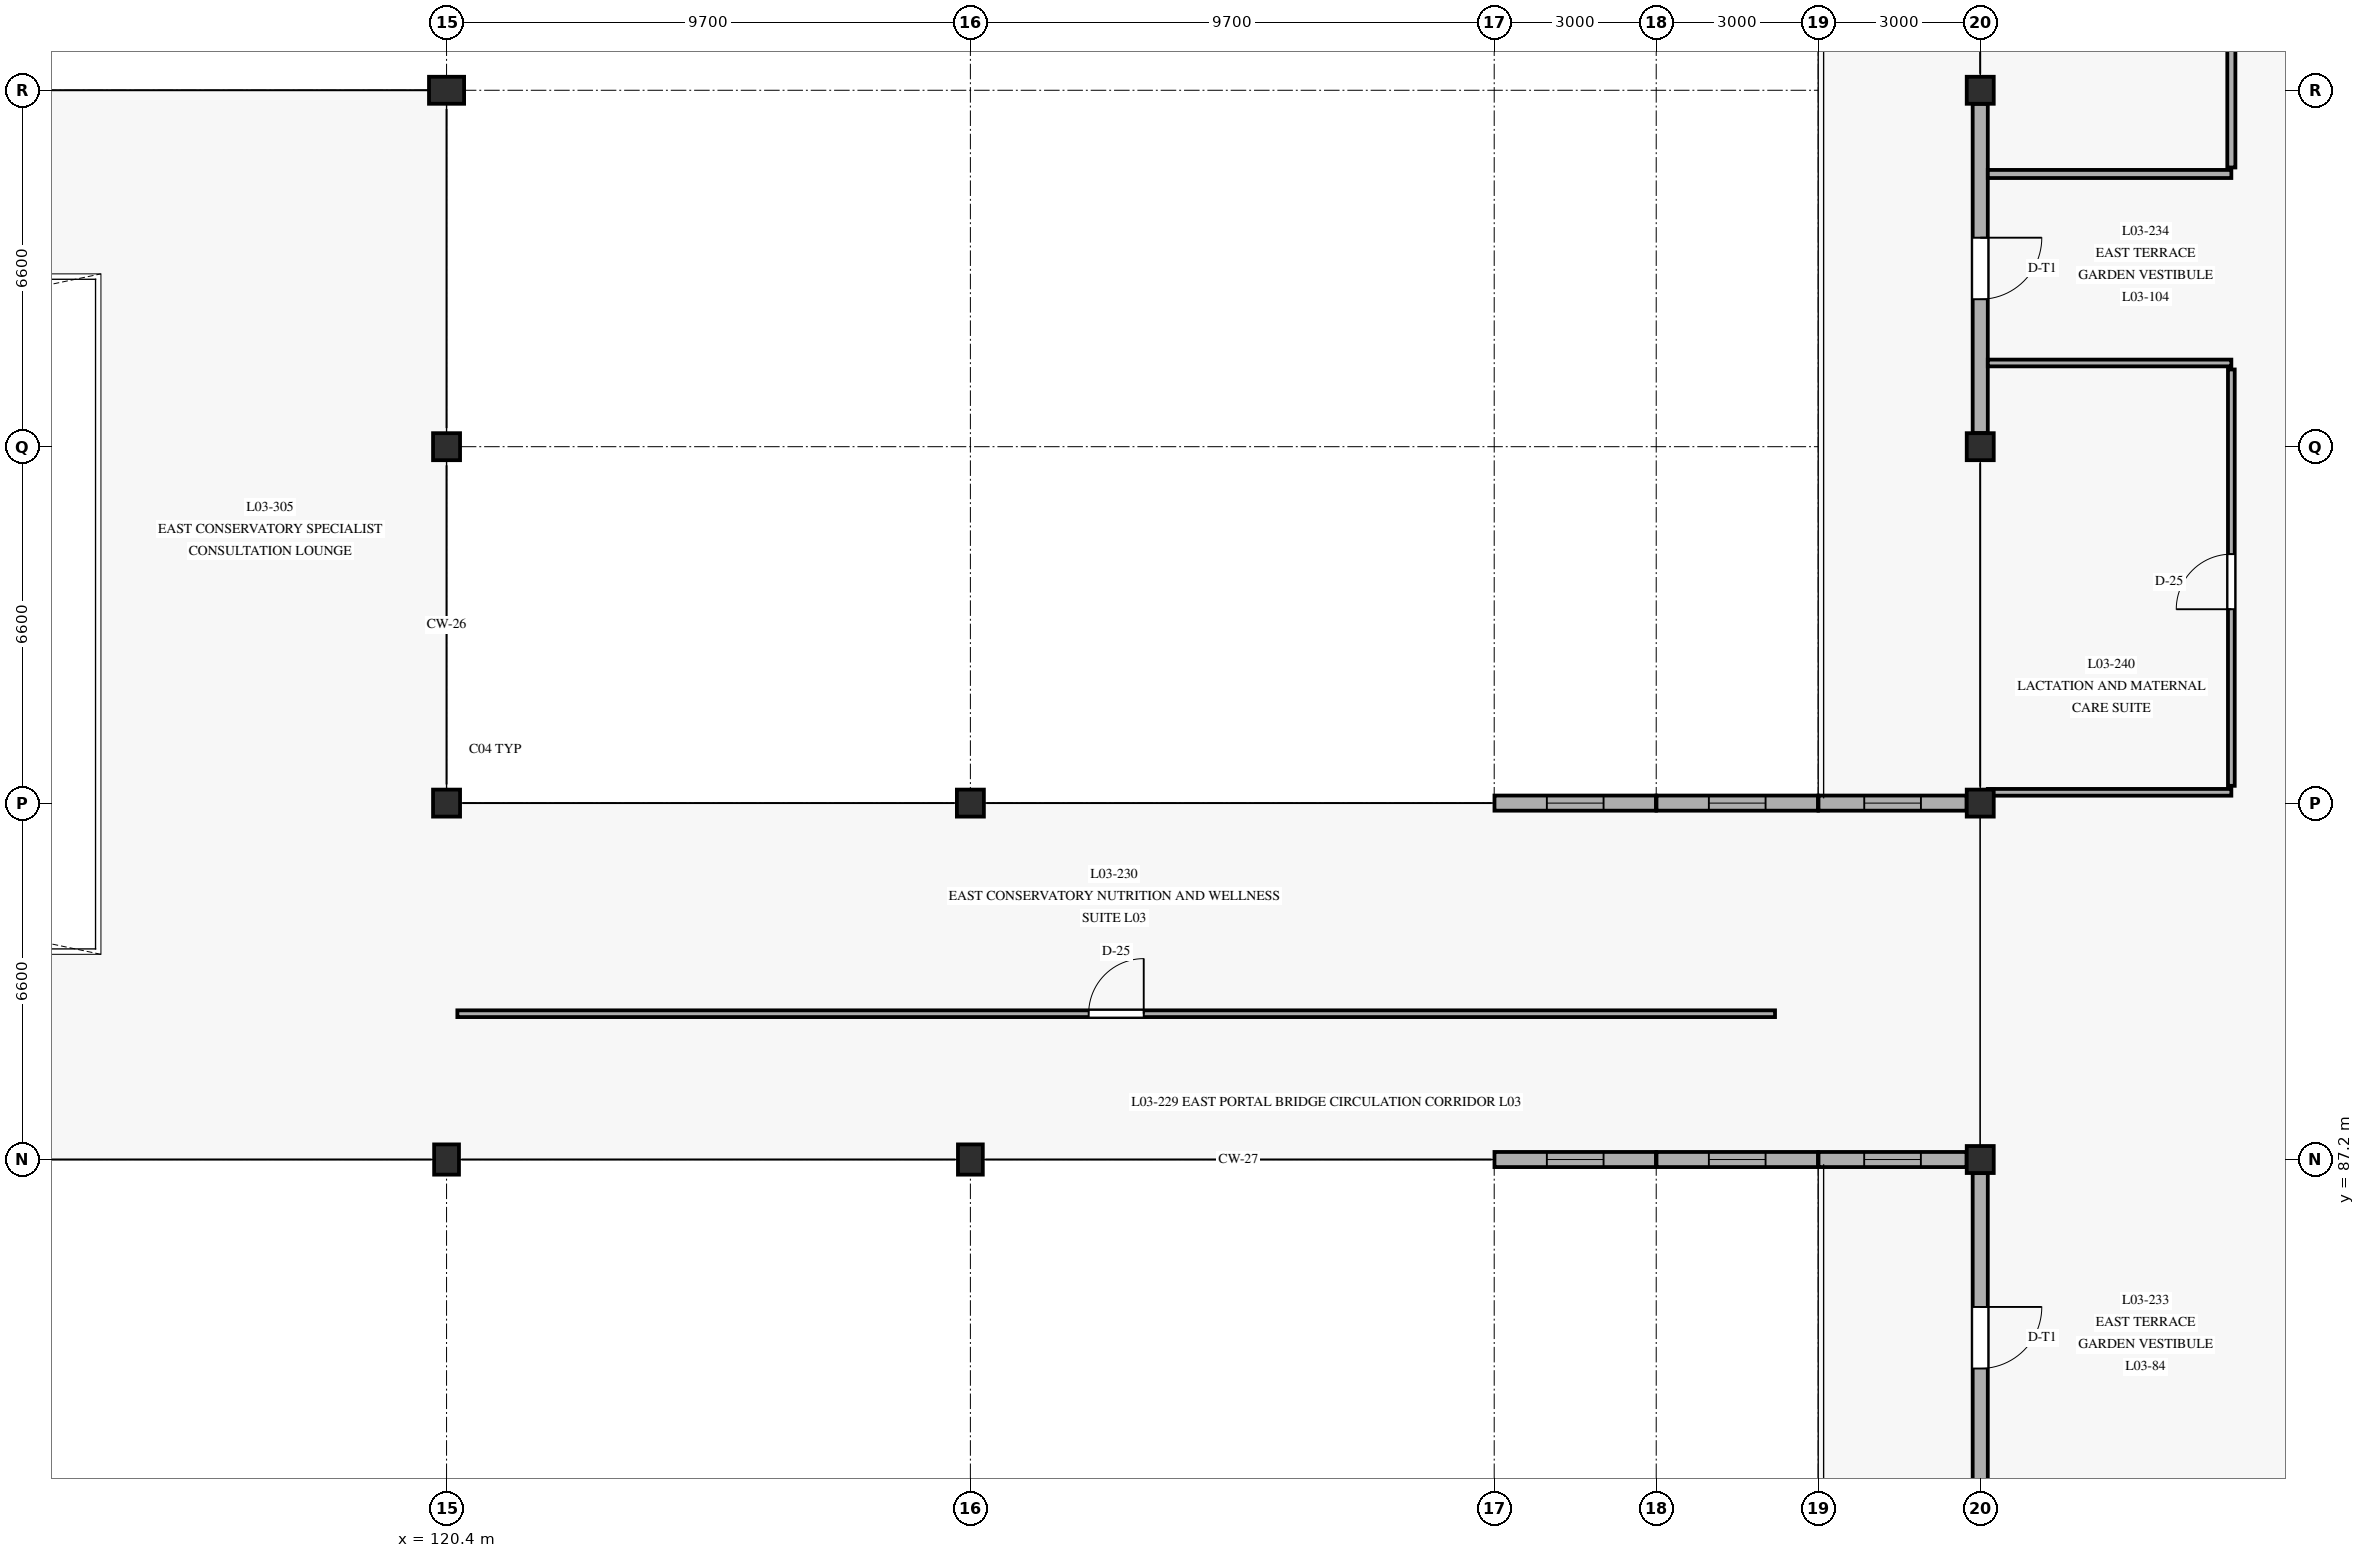
"""IFC4 building model, lengths in metres.
Left out: names, types, materials, properties, quantities, classifications, styles, units other than length and angle.
Written with IfcOpenShell. Run it as: python <this file> out.ifc"""

import sys

from ifc_helpers import new_model, si_unit, direction, frame, frame_2d, origin, origin_with_axes, origin_2d, place, context, subcontext, project, spatial, rectangle, extrude, element, fill, save


model = new_model("IFC4")
c1 = context("Model", 3, precision=1e-05, world=origin(), true_north=direction((0.0, 1.0)))
c2 = subcontext(c1, "Body", "Model", "MODEL_VIEW")
j1 = project(units=[si_unit("LENGTHUNIT", "METRE"), si_unit("PLANEANGLEUNIT", "RADIAN")], contexts=[c1])
p1 = place(None, origin())
s1 = spatial("IfcSite", under=j1, at=p1, CompositionType="ELEMENT")
p2 = place(p1, origin())
s2 = spatial("IfcBuilding", under=s1, at=p2, CompositionType="ELEMENT")
p3 = place(p2, frame((0.0, 0.0, 9.3)))
s3 = spatial("IfcBuildingStorey", under=s2, at=p3, CompositionType="ELEMENT", Elevation=9.3)
p4 = place(p3, frame((120.4, 87.2, 0.0), z_axis=(0.0, 0.0, 1.0), x_axis=(1.0, 0.0, 0.0)))
e1 = element("IfcColumn", 1, at=p4, inside=s3, PredefinedType="COLUMN", context=c2, shape_type="SweptSolid", body=[
    extrude(rectangle(XDim=0.46, YDim=0.56, at=origin_2d()), origin(), (0.0, 0.0, 1.0), 4.2),
])
for number, where, z_axis, x_axis in (
    (2, (120.4, 93.8, 0.0), (0.0, 0.0, 1.0), (1.0, 0.0, 0.0)),
    (3, (120.4, 100.4, 0.0), (0.0, 0.0, 1.0), (1.0, 0.0, 0.0)),
):
    element("IfcColumn", number, at=place(p3, frame(where, z_axis=z_axis, x_axis=x_axis)), inside=s3, PredefinedType="COLUMN", context=c2, shape_type="SweptSolid", body=[
        extrude(rectangle(XDim=0.5, YDim=0.5, at=origin_2d()), origin(), (0.0, 0.0, 1.0), 4.2),
    ])
p5 = place(p3, frame((120.4, 107.0, 0.0), z_axis=(0.0, 0.0, 1.0), x_axis=(1.0, 0.0, 0.0)))
e4 = element("IfcColumn", 4, at=p5, inside=s3, PredefinedType="COLUMN", context=c2, shape_type="SweptSolid", body=[
    extrude(rectangle(XDim=0.65, YDim=0.5, at=origin_2d()), origin(), (0.0, 0.0, 1.0), 4.2),
])
p6 = place(p3, frame((130.1, 87.2, 0.0), z_axis=(0.0, 0.0, 1.0), x_axis=(1.0, 0.0, 0.0)))
e5 = element("IfcColumn", 5, at=p6, inside=s3, PredefinedType="COLUMN", context=c2, shape_type="SweptSolid", body=[
    extrude(rectangle(XDim=0.46, YDim=0.56, at=origin_2d()), origin(), (0.0, 0.0, 1.0), 4.2),
])
for number, where, z_axis, x_axis in (
    (6, (130.1, 93.8, 0.0), (0.0, 0.0, 1.0), (1.0, 0.0, 0.0)),
    (7, (148.8, 87.2, 0.0), (0.0, 0.0, 1.0), (1.0, 0.0, 0.0)),
    (8, (148.8, 93.8, 0.0), (0.0, 0.0, 1.0), (1.0, 0.0, 0.0)),
    (9, (148.8, 100.4, 0.0), (0.0, 0.0, 1.0), (1.0, 0.0, 0.0)),
    (10, (148.8, 107.0, 0.0), (0.0, 0.0, 1.0), (1.0, 0.0, 0.0)),
):
    element("IfcColumn", number, at=place(p3, frame(where, z_axis=z_axis, x_axis=x_axis)), inside=s3, PredefinedType="COLUMN", context=c2, shape_type="SweptSolid", body=[
        extrude(rectangle(XDim=0.5, YDim=0.5, at=origin_2d()), origin(), (0.0, 0.0, 1.0), 4.2),
    ])
p7 = place(p3, frame((148.8, 86.948, 0.0), z_axis=(0.0, 0.0, 1.0), x_axis=(0.0, -1.0, 0.0)))
e11 = element("IfcWall", 11, at=p7, inside=s3, PredefinedType="SOLIDWALL", context=c2, shape_type="SweptSolid", body=[
    extrude(rectangle(XDim=6.096, YDim=0.28, at=frame_2d((3.048, 0.0))), origin(), (0.0, 0.0, 1.0), 3.57),
])
p8 = place(p7, frame((2.478, 0.0, 0.0)))
e12 = element("IfcOpeningElement", 12, at=p8, cuts=e11, PredefinedType="OPENING", context=c2, shape_type="SweptSolid", body=[
    extrude(rectangle(XDim=1.14, YDim=2.3, at=frame_2d((0.57, 1.15))), frame((0.0, 0.15, 0.0), z_axis=(0.0, -1.0, 0.0), x_axis=(1.0, 0.0, 0.0)), (0.0, 0.0, 1.0), 0.3),
])
p9 = place(p3, frame((148.8, 106.748, 0.0), z_axis=(0.0, 0.0, 1.0), x_axis=(0.0, -1.0, 0.0)))
e13 = element("IfcWall", 13, at=p9, inside=s3, PredefinedType="SOLIDWALL", context=c2, shape_type="SweptSolid", body=[
    extrude(rectangle(XDim=6.096, YDim=0.28, at=frame_2d((3.048, 0.0))), origin(), (0.0, 0.0, 1.0), 3.57),
])
p10 = place(p9, frame((2.478, 0.0, 0.0)))
e14 = element("IfcOpeningElement", 14, at=p10, cuts=e13, PredefinedType="OPENING", context=c2, shape_type="SweptSolid", body=[
    extrude(rectangle(XDim=1.14, YDim=2.3, at=frame_2d((0.57, 1.15))), frame((0.0, 0.15, 0.0), z_axis=(0.0, -1.0, 0.0), x_axis=(1.0, 0.0, 0.0)), (0.0, 0.0, 1.0), 0.3),
])
p11 = place(p3, frame((139.805, 87.2, 0.0), z_axis=(0.0, 0.0, 1.0), x_axis=(1.0, 0.0, 0.0)))
e15 = element("IfcWall", 15, at=p11, inside=s3, PredefinedType="SOLIDWALL", context=c2, shape_type="SweptSolid", body=[
    extrude(rectangle(XDim=2.99, YDim=0.28, at=frame_2d((1.495, 0.0))), origin(), (0.0, 0.0, 1.0), 3.95),
])
p12 = place(p11, frame((0.97, 0.0, 0.85)))
e16 = element("IfcOpeningElement", 16, at=p12, cuts=e15, PredefinedType="OPENING", context=c2, shape_type="SweptSolid", body=[
    extrude(rectangle(XDim=1.05, YDim=2.2, at=frame_2d((0.525, 1.1))), frame((0.0, 0.15, 0.0), z_axis=(0.0, -1.0, 0.0), x_axis=(1.0, 0.0, 0.0)), (0.0, 0.0, 1.0), 0.3),
])
p13 = place(p3, frame((142.795, 93.8, 0.0), z_axis=(0.0, 0.0, 1.0), x_axis=(-1.0, 0.0, 0.0)))
e17 = element("IfcWall", 17, at=p13, inside=s3, PredefinedType="SOLIDWALL", context=c2, shape_type="SweptSolid", body=[
    extrude(rectangle(XDim=2.99, YDim=0.28, at=frame_2d((1.495, 0.0))), origin(), (0.0, 0.0, 1.0), 3.95),
])
p14 = place(p13, frame((0.97, 0.0, 0.85)))
e18 = element("IfcOpeningElement", 18, at=p14, cuts=e17, PredefinedType="OPENING", context=c2, shape_type="SweptSolid", body=[
    extrude(rectangle(XDim=1.05, YDim=2.2, at=frame_2d((0.525, 1.1))), frame((0.0, 0.15, 0.0), z_axis=(0.0, -1.0, 0.0), x_axis=(1.0, 0.0, 0.0)), (0.0, 0.0, 1.0), 0.3),
])
p15 = place(p3, frame((142.805, 87.2, 0.0), z_axis=(0.0, 0.0, 1.0), x_axis=(1.0, 0.0, 0.0)))
e19 = element("IfcWall", 19, at=p15, inside=s3, PredefinedType="SOLIDWALL", context=c2, shape_type="SweptSolid", body=[
    extrude(rectangle(XDim=2.99, YDim=0.28, at=frame_2d((1.495, 0.0))), origin(), (0.0, 0.0, 1.0), 3.95),
])
p16 = place(p15, frame((0.97, 0.0, 0.85)))
e20 = element("IfcOpeningElement", 20, at=p16, cuts=e19, PredefinedType="OPENING", context=c2, shape_type="SweptSolid", body=[
    extrude(rectangle(XDim=1.05, YDim=2.2, at=frame_2d((0.525, 1.1))), frame((0.0, 0.15, 0.0), z_axis=(0.0, -1.0, 0.0), x_axis=(1.0, 0.0, 0.0)), (0.0, 0.0, 1.0), 0.3),
])
p17 = place(p3, frame((145.795, 93.8, 0.0), z_axis=(0.0, 0.0, 1.0), x_axis=(-1.0, 0.0, 0.0)))
e21 = element("IfcWall", 21, at=p17, inside=s3, PredefinedType="SOLIDWALL", context=c2, shape_type="SweptSolid", body=[
    extrude(rectangle(XDim=2.99, YDim=0.28, at=frame_2d((1.495, 0.0))), origin(), (0.0, 0.0, 1.0), 3.95),
])
p18 = place(p17, frame((0.97, 0.0, 0.85)))
e22 = element("IfcOpeningElement", 22, at=p18, cuts=e21, PredefinedType="OPENING", context=c2, shape_type="SweptSolid", body=[
    extrude(rectangle(XDim=1.05, YDim=2.2, at=frame_2d((0.525, 1.1))), frame((0.0, 0.15, 0.0), z_axis=(0.0, -1.0, 0.0), x_axis=(1.0, 0.0, 0.0)), (0.0, 0.0, 1.0), 0.3),
])
p19 = place(p3, frame((145.805, 87.2, 0.0), z_axis=(0.0, 0.0, 1.0), x_axis=(1.0, 0.0, 0.0)))
e23 = element("IfcWall", 23, at=p19, inside=s3, PredefinedType="SOLIDWALL", context=c2, shape_type="SweptSolid", body=[
    extrude(rectangle(XDim=2.743, YDim=0.28, at=frame_2d((1.372, 0.0))), origin(), (0.0, 0.0, 1.0), 3.95),
])
p20 = place(p19, frame((0.846, 0.0, 0.85)))
e24 = element("IfcOpeningElement", 24, at=p20, cuts=e23, PredefinedType="OPENING", context=c2, shape_type="SweptSolid", body=[
    extrude(rectangle(XDim=1.05, YDim=2.2, at=frame_2d((0.525, 1.1))), frame((0.0, 0.15, 0.0), z_axis=(0.0, -1.0, 0.0), x_axis=(1.0, 0.0, 0.0)), (0.0, 0.0, 1.0), 0.3),
])
p21 = place(p3, frame((148.548, 93.8, 0.0), z_axis=(0.0, 0.0, 1.0), x_axis=(-1.0, 0.0, 0.0)))
e25 = element("IfcWall", 25, at=p21, inside=s3, PredefinedType="SOLIDWALL", context=c2, shape_type="SweptSolid", body=[
    extrude(rectangle(XDim=2.743, YDim=0.28, at=frame_2d((1.372, 0.0))), origin(), (0.0, 0.0, 1.0), 3.95),
])
p22 = place(p21, frame((0.846, 0.0, 0.85)))
e26 = element("IfcOpeningElement", 26, at=p22, cuts=e25, PredefinedType="OPENING", context=c2, shape_type="SweptSolid", body=[
    extrude(rectangle(XDim=1.05, YDim=2.2, at=frame_2d((0.525, 1.1))), frame((0.0, 0.15, 0.0), z_axis=(0.0, -1.0, 0.0), x_axis=(1.0, 0.0, 0.0)), (0.0, 0.0, 1.0), 0.3),
])
p23 = place(p3, frame((120.6, 89.9, 0.0), z_axis=(0.0, 0.0, 1.0), x_axis=(1.0, 0.0, 0.0)))
e27 = element("IfcWall", 27, at=p23, inside=s3, PredefinedType="PARTITIONING", context=c2, shape_type="SweptSolid", body=[
    extrude(rectangle(XDim=24.4, YDim=0.125, at=frame_2d((12.2, 0.0))), origin(), (0.0, 0.0, 1.0), 3.565),
])
p24 = place(p23, frame((11.69, 0.0, 0.0)))
e28 = element("IfcOpeningElement", 28, at=p24, cuts=e27, PredefinedType="OPENING", context=c2, shape_type="SweptSolid", body=[
    extrude(rectangle(XDim=1.02, YDim=2.18, at=frame_2d((0.51, 1.09))), frame((0.0, 0.073, 0.0), z_axis=(0.0, -1.0, 0.0), x_axis=(1.0, 0.0, 0.0)), (0.0, 0.0, 1.0), 0.145),
])
p25 = place(p3, frame((153.45, 94.12, 0.0), z_axis=(0.0, 0.0, 1.0), x_axis=(0.0, 1.0, 0.0)))
e29 = element("IfcWall", 29, at=p25, inside=s3, PredefinedType="PARTITIONING", context=c2, shape_type="SweptSolid", body=[
    extrude(rectangle(XDim=7.71, YDim=0.125, at=frame_2d((3.855, 0.0))), origin(), (0.0, 0.0, 1.0), 3.495),
])
p26 = place(p25, frame((3.27, 0.0, 0.0)))
e30 = element("IfcOpeningElement", 30, at=p26, cuts=e29, PredefinedType="OPENING", context=c2, shape_type="SweptSolid", body=[
    extrude(rectangle(XDim=1.02, YDim=2.18, at=frame_2d((0.51, 1.09))), frame((0.0, 0.073, 0.0), z_axis=(0.0, -1.0, 0.0), x_axis=(1.0, 0.0, 0.0)), (0.0, 0.0, 1.0), 0.145),
])
p27 = place(p3, frame((148.94, 94.0, 0.0), z_axis=(0.0, 0.0, 1.0), x_axis=(1.0, 0.0, 0.0)))
e31 = element("IfcWall", 31, at=p27, inside=s3, PredefinedType="PARTITIONING", context=c2, shape_type="SweptSolid", body=[
    extrude(rectangle(XDim=4.51, YDim=0.125, at=frame_2d((2.255, 0.0))), origin(), (0.0, 0.0, 1.0), 3.495),
])
p28 = place(p3, frame((148.94, 101.95, 0.0), z_axis=(0.0, 0.0, 1.0), x_axis=(1.0, 0.0, 0.0)))
e32 = element("IfcWall", 32, at=p28, inside=s3, PredefinedType="PARTITIONING", context=c2, shape_type="SweptSolid", body=[
    extrude(rectangle(XDim=4.51, YDim=0.125, at=frame_2d((2.255, 0.0))), origin(), (0.0, 0.0, 1.0), 3.565),
])
p29 = place(p3, frame((153.45, 105.57, 0.0), z_axis=(0.0, 0.0, 1.0), x_axis=(0.0, 1.0, 0.0)))
e33 = element("IfcWall", 33, at=p29, inside=s3, PredefinedType="PARTITIONING", context=c2, shape_type="SweptSolid", body=[
    extrude(rectangle(XDim=7.71, YDim=0.15, at=frame_2d((3.855, 0.0))), origin(), (0.0, 0.0, 1.0), 3.495),
])
p30 = place(p29, frame((2.979, 0.0, 0.0)))
e34 = element("IfcOpeningElement", 34, at=p30, cuts=e33, PredefinedType="OPENING", context=c2, shape_type="SweptSolid", body=[
    extrude(rectangle(XDim=1.6, YDim=2.25, at=frame_2d((0.8, 1.125))), frame((0.0, 0.085, 0.0), z_axis=(0.0, -1.0, 0.0), x_axis=(1.0, 0.0, 0.0)), (0.0, 0.0, 1.0), 0.17),
])
p31 = place(p3, frame((148.94, 105.45, 0.0), z_axis=(0.0, 0.0, 1.0), x_axis=(1.0, 0.0, 0.0)))
e35 = element("IfcWall", 35, at=p31, inside=s3, PredefinedType="PARTITIONING", context=c2, shape_type="SweptSolid", body=[
    extrude(rectangle(XDim=4.51, YDim=0.15, at=frame_2d((2.255, 0.0))), origin(), (0.0, 0.0, 1.0), 3.565),
])
p32 = place(p8, frame((1.14, 0.0, 0.0), z_axis=(0.0, 0.0, 1.0), x_axis=(-1.0, 0.0, 0.0)))
e36 = element("IfcDoor", 36, at=p32, inside=s3, OperationType="SINGLE_SWING_RIGHT", PredefinedType="DOOR", context=c2, shape_type="SweptSolid", body=[
    extrude(rectangle(XDim=1.14, YDim=2.3, at=frame_2d((0.57, 1.15))), frame((0.0, 0.025, 0.0), z_axis=(0.0, -1.0, 0.0), x_axis=(1.0, 0.0, 0.0)), (0.0, 0.0, 1.0), 0.05),
])
fill(e12, e36)
p33 = place(p10, frame((1.14, 0.0, 0.0), z_axis=(0.0, 0.0, 1.0), x_axis=(-1.0, 0.0, 0.0)))
e37 = element("IfcDoor", 37, at=p33, inside=s3, OperationType="SINGLE_SWING_RIGHT", PredefinedType="DOOR", context=c2, shape_type="SweptSolid", body=[
    extrude(rectangle(XDim=1.14, YDim=2.3, at=frame_2d((0.57, 1.15))), frame((0.0, 0.025, 0.0), z_axis=(0.0, -1.0, 0.0), x_axis=(1.0, 0.0, 0.0)), (0.0, 0.0, 1.0), 0.05),
])
fill(e14, e37)
p34 = place(p12, origin_with_axes())
e38 = element("IfcWindow", 38, at=p34, inside=s3, PartitioningType="SINGLE_PANEL", PredefinedType="WINDOW", context=c2, shape_type="SweptSolid", body=[
    extrude(rectangle(XDim=1.05, YDim=2.2, at=frame_2d((0.525, 1.1))), frame((0.0, 0.03, 0.0), z_axis=(0.0, -1.0, 0.0), x_axis=(1.0, 0.0, 0.0)), (0.0, 0.0, 1.0), 0.06),
])
fill(e16, e38)
p35 = place(p14, origin_with_axes())
e39 = element("IfcWindow", 39, at=p35, inside=s3, PartitioningType="SINGLE_PANEL", PredefinedType="WINDOW", context=c2, shape_type="SweptSolid", body=[
    extrude(rectangle(XDim=1.05, YDim=2.2, at=frame_2d((0.525, 1.1))), frame((0.0, 0.03, 0.0), z_axis=(0.0, -1.0, 0.0), x_axis=(1.0, 0.0, 0.0)), (0.0, 0.0, 1.0), 0.06),
])
fill(e18, e39)
p36 = place(p16, origin_with_axes())
e40 = element("IfcWindow", 40, at=p36, inside=s3, PartitioningType="SINGLE_PANEL", PredefinedType="WINDOW", context=c2, shape_type="SweptSolid", body=[
    extrude(rectangle(XDim=1.05, YDim=2.2, at=frame_2d((0.525, 1.1))), frame((0.0, 0.03, 0.0), z_axis=(0.0, -1.0, 0.0), x_axis=(1.0, 0.0, 0.0)), (0.0, 0.0, 1.0), 0.06),
])
fill(e20, e40)
p37 = place(p18, origin_with_axes())
e41 = element("IfcWindow", 41, at=p37, inside=s3, PartitioningType="SINGLE_PANEL", PredefinedType="WINDOW", context=c2, shape_type="SweptSolid", body=[
    extrude(rectangle(XDim=1.05, YDim=2.2, at=frame_2d((0.525, 1.1))), frame((0.0, 0.03, 0.0), z_axis=(0.0, -1.0, 0.0), x_axis=(1.0, 0.0, 0.0)), (0.0, 0.0, 1.0), 0.06),
])
fill(e22, e41)
p38 = place(p20, origin_with_axes())
e42 = element("IfcWindow", 42, at=p38, inside=s3, PartitioningType="SINGLE_PANEL", PredefinedType="WINDOW", context=c2, shape_type="SweptSolid", body=[
    extrude(rectangle(XDim=1.05, YDim=2.2, at=frame_2d((0.525, 1.1))), frame((0.0, 0.03, 0.0), z_axis=(0.0, -1.0, 0.0), x_axis=(1.0, 0.0, 0.0)), (0.0, 0.0, 1.0), 0.06),
])
fill(e24, e42)
p39 = place(p22, origin_with_axes())
e43 = element("IfcWindow", 43, at=p39, inside=s3, PartitioningType="SINGLE_PANEL", PredefinedType="WINDOW", context=c2, shape_type="SweptSolid", body=[
    extrude(rectangle(XDim=1.05, YDim=2.2, at=frame_2d((0.525, 1.1))), frame((0.0, 0.03, 0.0), z_axis=(0.0, -1.0, 0.0), x_axis=(1.0, 0.0, 0.0)), (0.0, 0.0, 1.0), 0.06),
])
fill(e26, e43)
p40 = place(p24, origin_with_axes())
e44 = element("IfcDoor", 44, at=p40, inside=s3, OperationType="SINGLE_SWING_RIGHT", PredefinedType="DOOR", context=c2, shape_type="SweptSolid", body=[
    extrude(rectangle(XDim=1.02, YDim=2.18, at=frame_2d((0.51, 1.09))), frame((0.0, 0.025, 0.0), z_axis=(0.0, -1.0, 0.0), x_axis=(1.0, 0.0, 0.0)), (0.0, 0.0, 1.0), 0.05),
])
fill(e28, e44)
p41 = place(p26, origin_with_axes())
e45 = element("IfcDoor", 45, at=p41, inside=s3, OperationType="SINGLE_SWING_LEFT", PredefinedType="DOOR", context=c2, shape_type="SweptSolid", body=[
    extrude(rectangle(XDim=1.02, YDim=2.18, at=frame_2d((0.51, 1.09))), frame((0.0, 0.025, 0.0), z_axis=(0.0, -1.0, 0.0), x_axis=(1.0, 0.0, 0.0)), (0.0, 0.0, 1.0), 0.05),
])
fill(e30, e45)
save(model, sys.argv[1])
